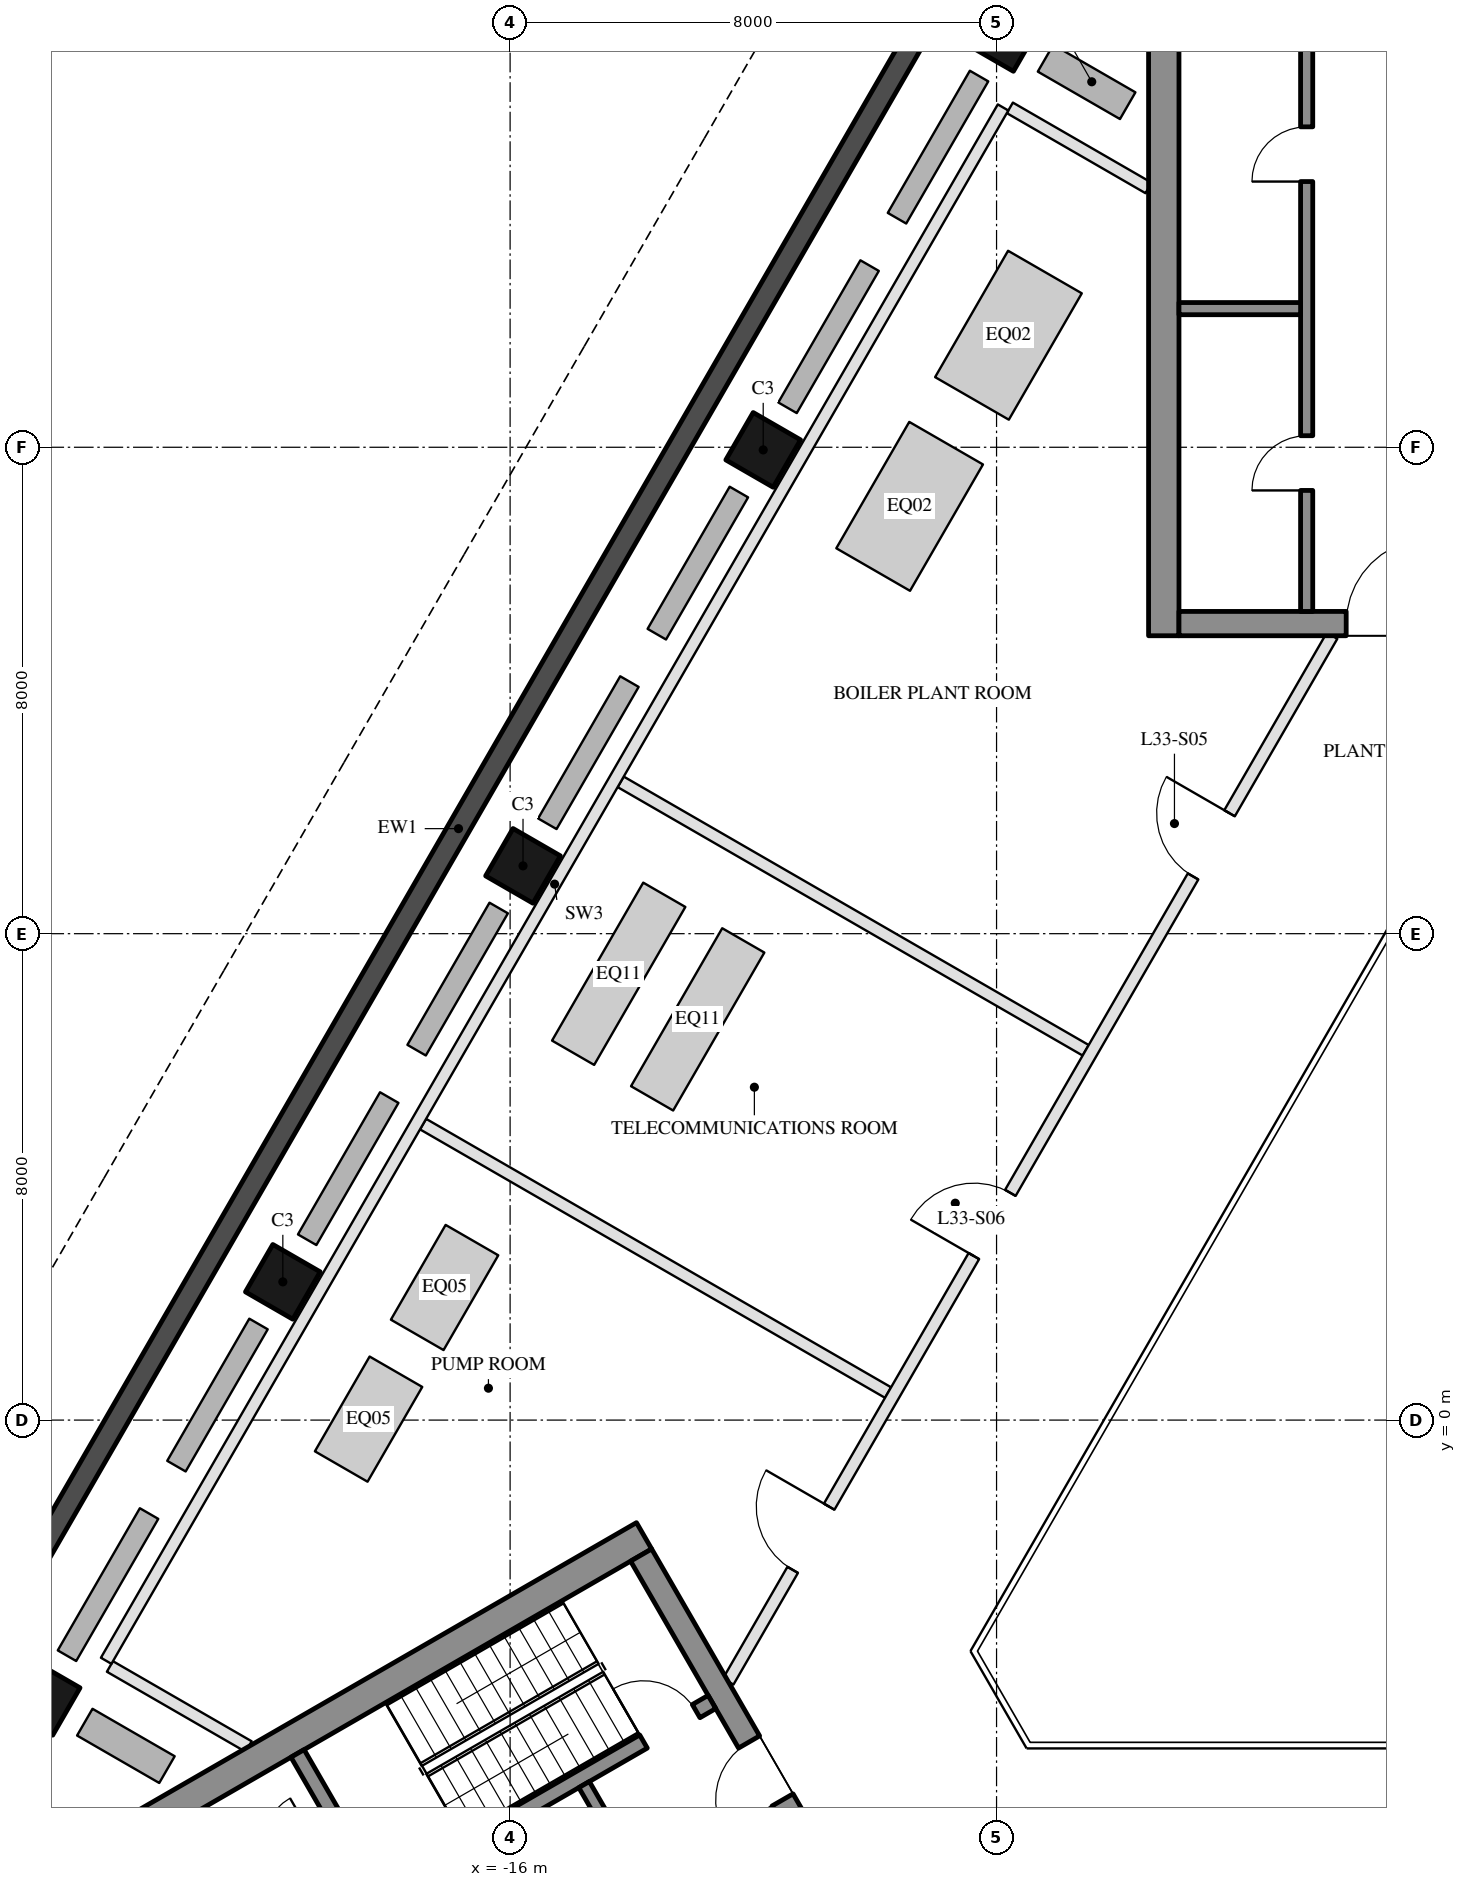
"""IFC4 building model, lengths in metres.
Left out: names, types, materials, properties, quantities, classifications, styles, units other than length and angle.
Written with IfcOpenShell. Run it as: python <this file> out.ifc"""

import sys

from ifc_helpers import new_model, si_unit, direction, frame, frame_2d, origin, origin_2d, place, context, subcontext, project, spatial, rectangle, hollow_rectangle, extrude, element, fill, save


model = new_model("IFC4")
c1 = context("Model", 3, precision=1e-05, world=origin(), true_north=direction((0.0, 1.0)))
c2 = subcontext(c1, "Body", "Model", "MODEL_VIEW")
j1 = project(units=[si_unit("LENGTHUNIT", "METRE"), si_unit("PLANEANGLEUNIT", "RADIAN")], contexts=[c1])
p1 = place(None, origin())
s1 = spatial("IfcSite", under=j1, at=p1, CompositionType="ELEMENT")
p2 = place(p1, origin())
s2 = spatial("IfcBuilding", under=s1, at=p2, CompositionType="ELEMENT")
p3 = place(p2, frame((0.0, 0.0, 142.1)))
s3 = spatial("IfcBuildingStorey", under=s2, at=p3, CompositionType="ELEMENT", Elevation=142.1)
for number, where, z_axis, x_axis in (
    (1, (-7.888, 22.798, 0.0), (0.0, 0.0, 1.0), (0.5, 0.866, 0.0)),
    (2, (-11.838, 15.957, 0.0), (0.0, 0.0, 1.0), (0.5, 0.866, 0.0)),
    (3, (-15.788, 9.115, 0.0), (0.0, 0.0, 1.0), (0.5, 0.866, 0.0)),
    (4, (-19.738, 2.273, 0.0), (0.0, 0.0, 1.0), (0.5, 0.866, 0.0)),
    (5, (-23.688, -4.568, 0.0), (0.0, 0.0, 1.0), (0.5, 0.866, 0.0)),
):
    element("IfcColumn", number, at=place(p3, frame(where, z_axis=z_axis, x_axis=x_axis)), inside=s3, PredefinedType="COLUMN", context=c2, shape_type="SweptSolid", body=[
        extrude(hollow_rectangle(XDim=0.9, YDim=0.9, WallThickness=0.04, at=origin_2d()), origin(), (0.0, 0.0, 1.0), 4.5),
    ])
p4 = place(p3, frame((-7.441, 26.022, 0.0), z_axis=(0.0, 0.0, 1.0), x_axis=(-0.499998380999, -0.866026338513, 0.0)))
e6 = element("IfcWall", 6, at=p4, inside=s3, PredefinedType="SOLIDWALL", context=c2, shape_type="SweptSolid", body=[
    extrude(rectangle(XDim=37.631, YDim=0.35, at=frame_2d((18.816, 0.0))), origin(), (0.0, 0.0, 1.0), 4.35),
])
p5 = place(p3, frame((-5.25, 12.9, 0.0), z_axis=(0.0, 0.0, 1.0), x_axis=(0.0, 1.0, 0.0)))
e7 = element("IfcWall", 7, at=p5, inside=s3, PredefinedType="SHEAR", context=c2, shape_type="SweptSolid", body=[
    extrude(rectangle(XDim=14.837, YDim=0.5, at=frame_2d((7.418, 0.0))), origin(), (0.0, 0.0, 1.0), 4.3),
])
p6 = place(p3, frame((5.0, 13.1, 0.0), z_axis=(0.0, 0.0, 1.0), x_axis=(-1.0, 0.0, 0.0)))
e8 = element("IfcWall", 8, at=p6, inside=s3, PredefinedType="SHEAR", context=c2, shape_type="SweptSolid", body=[
    extrude(rectangle(XDim=10.0, YDim=0.4, at=frame_2d((5.0, 0.0))), origin(), (0.0, 0.0, 1.0), 4.3),
])
p7 = place(p6, frame((3.55, 0.0, 0.0)))
e9 = element("IfcOpeningElement", 9, at=p7, cuts=e8, PredefinedType="OPENING", context=c2, shape_type="SweptSolid", body=[
    extrude(rectangle(XDim=1.1, YDim=2.1, at=frame_2d((0.55, 1.05))), frame((0.0, 0.21, 0.0), z_axis=(0.0, -1.0, 0.0), x_axis=(1.0, 0.0, 0.0)), (0.0, 0.0, 1.0), 0.42),
])
p8 = place(p6, frame((5.85, 0.0, 0.0)))
e10 = element("IfcOpeningElement", 10, at=p8, cuts=e8, PredefinedType="OPENING", context=c2, shape_type="SweptSolid", body=[
    extrude(rectangle(XDim=1.4, YDim=2.1, at=frame_2d((0.7, 1.05))), frame((0.0, 0.21, 0.0), z_axis=(0.0, -1.0, 0.0), x_axis=(1.0, 0.0, 0.0)), (0.0, 0.0, 1.0), 0.42),
])
p9 = place(p3, frame((-2.9, 13.3, 0.0), z_axis=(0.0, 0.0, 1.0), x_axis=(0.0, 1.0, 0.0)))
e11 = element("IfcWall", 11, at=p9, inside=s3, PredefinedType="SHEAR", context=c2, shape_type="SweptSolid", body=[
    extrude(rectangle(XDim=12.6, YDim=0.2, at=frame_2d((6.3, 0.0))), origin(), (0.0, 0.0, 1.0), 4.3),
])
p10 = place(p9, frame((1.99, 0.0, 0.0)))
e12 = element("IfcOpeningElement", 12, at=p10, cuts=e11, PredefinedType="OPENING", context=c2, shape_type="SweptSolid", body=[
    extrude(rectangle(XDim=0.9, YDim=2.1, at=frame_2d((0.45, 1.05))), frame((0.0, 0.11, 0.0), z_axis=(0.0, -1.0, 0.0), x_axis=(1.0, 0.0, 0.0)), (0.0, 0.0, 1.0), 0.22),
])
p11 = place(p9, frame((7.07, 0.0, 0.0)))
e13 = element("IfcOpeningElement", 13, at=p11, cuts=e11, PredefinedType="OPENING", context=c2, shape_type="SweptSolid", body=[
    extrude(rectangle(XDim=0.9, YDim=2.1, at=frame_2d((0.45, 1.05))), frame((0.0, 0.11, 0.0), z_axis=(0.0, -1.0, 0.0), x_axis=(1.0, 0.0, 0.0)), (0.0, 0.0, 1.0), 0.22),
])
p12 = place(p9, frame((10.51, 0.0, 0.0)))
e14 = element("IfcOpeningElement", 14, at=p12, cuts=e11, PredefinedType="OPENING", context=c2, shape_type="SweptSolid", body=[
    extrude(rectangle(XDim=0.9, YDim=2.1, at=frame_2d((0.45, 1.05))), frame((0.0, 0.11, 0.0), z_axis=(0.0, -1.0, 0.0), x_axis=(1.0, 0.0, 0.0)), (0.0, 0.0, 1.0), 0.22),
])
p13 = place(p3, frame((-3.0, 18.28, 0.0), z_axis=(0.0, 0.0, 1.0), x_axis=(-1.0, 0.0, 0.0)))
e15 = element("IfcWall", 15, at=p13, inside=s3, PredefinedType="SHEAR", context=c2, shape_type="SweptSolid", body=[
    extrude(rectangle(XDim=2.0, YDim=0.2, at=frame_2d((1.0, 0.0))), origin(), (0.0, 0.0, 1.0), 4.3),
])
p14 = place(p3, frame((-13.797, -1.903, 0.0), z_axis=(0.0, 0.0, 1.0), x_axis=(-0.866025009528, -0.500000682871, 0.0)))
e16 = element("IfcWall", 16, at=p14, inside=s3, PredefinedType="SHEAR", context=c2, shape_type="SweptSolid", body=[
    extrude(rectangle(XDim=14.837, YDim=0.5, at=frame_2d((7.418, 0.0))), origin(), (0.0, 0.0, 1.0), 4.3),
])
p15 = place(p3, frame((-13.845, -2.22, 0.0), z_axis=(0.0, 0.0, 1.0), x_axis=(0.500004234368, -0.866022959057, 0.0)))
e17 = element("IfcWall", 17, at=p15, inside=s3, PredefinedType="SHEAR", context=c2, shape_type="SweptSolid", body=[
    extrude(rectangle(XDim=10.0, YDim=0.4, at=frame_2d((5.0, 0.0))), origin(), (0.0, 0.0, 1.0), 4.3),
])
p16 = place(p15, frame((3.55, 0.0, 0.0)))
e18 = element("IfcOpeningElement", 18, at=p16, cuts=e17, PredefinedType="OPENING", context=c2, shape_type="SweptSolid", body=[
    extrude(rectangle(XDim=1.1, YDim=2.1, at=frame_2d((0.55, 1.05))), frame((0.0, 0.21, 0.0), z_axis=(0.0, -1.0, 0.0), x_axis=(1.0, 0.0, 0.0)), (0.0, 0.0, 1.0), 0.42),
])
p17 = place(p15, frame((5.85, 0.0, 0.0)))
e19 = element("IfcOpeningElement", 19, at=p17, cuts=e17, PredefinedType="OPENING", context=c2, shape_type="SweptSolid", body=[
    extrude(rectangle(XDim=1.4, YDim=2.1, at=frame_2d((0.7, 1.05))), frame((0.0, 0.21, 0.0), z_axis=(0.0, -1.0, 0.0), x_axis=(1.0, 0.0, 0.0)), (0.0, 0.0, 1.0), 0.42),
])
p18 = place(p3, frame((-12.681, -4.636, 0.0), z_axis=(0.0, 0.0, 1.0), x_axis=(-0.866021702275, -0.500006411147, 0.0)))
e20 = element("IfcWall", 20, at=p18, inside=s3, PredefinedType="SHEAR", context=c2, shape_type="SweptSolid", body=[
    extrude(rectangle(XDim=6.45, YDim=0.25, at=frame_2d((3.225, 0.0))), origin(), (0.0, 0.0, 1.0), 4.3),
])
p19 = place(p18, frame((0.3, 0.0, 0.0)))
e21 = element("IfcOpeningElement", 21, at=p19, cuts=e20, PredefinedType="OPENING", context=c2, shape_type="SweptSolid", body=[
    extrude(rectangle(XDim=1.0, YDim=2.1, at=frame_2d((0.5, 1.05))), frame((0.0, 0.135, 0.0), z_axis=(0.0, -1.0, 0.0), x_axis=(1.0, 0.0, 0.0)), (0.0, 0.0, 1.0), 0.27),
])
p20 = place(p3, frame((-19.496, -5.482, 0.0), z_axis=(0.0, 0.0, 1.0), x_axis=(0.499990435942, -0.866030925526, 0.0)))
e22 = element("IfcWall", 22, at=p20, inside=s3, PredefinedType="SHEAR", context=c2, shape_type="SweptSolid", body=[
    extrude(rectangle(XDim=2.55, YDim=0.25, at=frame_2d((1.275, 0.0))), origin(), (0.0, 0.0, 1.0), 4.3),
])
p21 = place(p3, frame((-14.783, -5.995, 0.0), z_axis=(0.0, 0.0, 1.0), x_axis=(0.49994636267, -0.866056369097, 0.0)))
e23 = element("IfcWall", 23, at=p21, inside=s3, PredefinedType="SHEAR", context=c2, shape_type="SweptSolid", body=[
    extrude(rectangle(XDim=2.8, YDim=0.2, at=frame_2d((1.4, 0.0))), origin(), (0.0, 0.0, 1.0), 4.3),
])
p22 = place(p21, frame((0.7, 0.0, 0.0)))
e24 = element("IfcOpeningElement", 24, at=p22, cuts=e23, PredefinedType="OPENING", context=c2, shape_type="SweptSolid", body=[
    extrude(rectangle(XDim=1.2, YDim=2.1, at=frame_2d((0.6, 1.05))), frame((0.0, 0.11, 0.0), z_axis=(0.0, -1.0, 0.0), x_axis=(1.0, 0.0, 0.0)), (0.0, 0.0, 1.0), 0.22),
])
p23 = place(p3, frame((-21.076, -6.395, 0.0), z_axis=(0.0, 0.0, 1.0), x_axis=(0.50001468107, -0.866016927499, 0.0)))
e25 = element("IfcWall", 25, at=p23, inside=s3, PredefinedType="PARTITIONING", context=c2, shape_type="SweptSolid", body=[
    extrude(rectangle(XDim=5.4, YDim=0.2, at=frame_2d((2.7, 0.0))), origin(), (0.0, 0.0, 1.0), 4.3),
])
p24 = place(p23, frame((1.913, 0.0, 0.0)))
e26 = element("IfcOpeningElement", 26, at=p24, cuts=e25, PredefinedType="OPENING", context=c2, shape_type="SweptSolid", body=[
    extrude(rectangle(XDim=0.9, YDim=2.1, at=frame_2d((0.45, 1.05))), frame((0.0, 0.11, 0.0), z_axis=(0.0, -1.0, 0.0), x_axis=(1.0, 0.0, 0.0)), (0.0, 0.0, 1.0), 0.22),
])
p25 = place(p23, frame((3.788, 0.0, 0.0)))
e27 = element("IfcOpeningElement", 27, at=p25, cuts=e25, PredefinedType="OPENING", context=c2, shape_type="SweptSolid", body=[
    extrude(rectangle(XDim=0.9, YDim=2.1, at=frame_2d((0.45, 1.05))), frame((0.0, 0.11, 0.0), z_axis=(0.0, -1.0, 0.0), x_axis=(1.0, 0.0, 0.0)), (0.0, 0.0, 1.0), 0.22),
])
p26 = place(p3, frame((-7.781, 21.582, 0.0), z_axis=(0.0, 0.0, 1.0), x_axis=(0.865998849027, -0.500045991369, 0.0)))
e28 = element("IfcWall", 28, at=p26, inside=s3, PredefinedType="PARTITIONING", context=c2, shape_type="SweptSolid", body=[
    extrude(rectangle(XDim=2.635, YDim=0.2, at=frame_2d((1.317, 0.0))), origin(), (0.0, 0.0, 1.0), 4.35),
])
for number, where, z_axis, x_axis in (
    (29, (-14.181, 10.497, 0.0), (0.0, 0.0, 1.0), (0.866, -0.5, 0.0)),
    (30, (-17.431, 4.868, 0.0), (0.0, 0.0, 1.0), (0.866, -0.5, 0.0)),
):
    element("IfcWall", number, at=place(p3, frame(where, z_axis=z_axis, x_axis=x_axis)), inside=s3, PredefinedType="PARTITIONING", context=c2, shape_type="SweptSolid", body=[
        extrude(rectangle(XDim=8.83, YDim=0.2, at=frame_2d((4.415, 0.0))), origin(), (0.0, 0.0, 1.0), 4.35),
    ])
p27 = place(p3, frame((-22.581, -4.052, 0.0), z_axis=(0.0, 0.0, 1.0), x_axis=(0.866038977738, -0.499976488486, 0.0)))
e31 = element("IfcWall", 31, at=p27, inside=s3, PredefinedType="PARTITIONING", context=c2, shape_type="SweptSolid", body=[
    extrude(rectangle(XDim=2.635, YDim=0.2, at=frame_2d((1.317, 0.0))), origin(), (0.0, 0.0, 1.0), 4.35),
])
p28 = place(p3, frame((-7.893, 21.589, 0.0), z_axis=(0.0, 0.0, 1.0), x_axis=(-0.499998500593, -0.866026269466, 0.0)))
e32 = element("IfcWall", 32, at=p28, inside=s3, PredefinedType="PARTITIONING", context=c2, shape_type="SweptSolid", body=[
    extrude(rectangle(XDim=29.5, YDim=0.2, at=frame_2d((14.75, 0.0))), origin(), (0.0, 0.0, 1.0), 3.75),
])
p29 = place(p3, frame((-2.482, 12.9, 0.0), z_axis=(0.0, 0.0, 1.0), x_axis=(-0.50000478328, -0.866022642139, 0.0)))
e33 = element("IfcWall", 33, at=p29, inside=s3, PredefinedType="PARTITIONING", context=c2, shape_type="SweptSolid", body=[
    extrude(rectangle(XDim=19.861, YDim=0.2, at=frame_2d((9.931, 0.0))), origin(), (0.0, 0.0, 1.0), 3.75),
])
p30 = place(p29, frame((3.371, 0.0, 0.0)))
e34 = element("IfcOpeningElement", 34, at=p30, cuts=e33, PredefinedType="OPENING", context=c2, shape_type="SweptSolid", body=[
    extrude(rectangle(XDim=1.2, YDim=2.1, at=frame_2d((0.6, 1.05))), frame((0.0, 0.11, 0.0), z_axis=(0.0, -1.0, 0.0), x_axis=(1.0, 0.0, 0.0)), (0.0, 0.0, 1.0), 0.22),
])
p31 = place(p29, frame((10.581, 0.0, 0.0)))
e35 = element("IfcOpeningElement", 35, at=p31, cuts=e33, PredefinedType="OPENING", context=c2, shape_type="SweptSolid", body=[
    extrude(rectangle(XDim=1.2, YDim=2.1, at=frame_2d((0.6, 1.05))), frame((0.0, 0.11, 0.0), z_axis=(0.0, -1.0, 0.0), x_axis=(1.0, 0.0, 0.0)), (0.0, 0.0, 1.0), 0.22),
])
p32 = place(p29, frame((16.54, 0.0, 0.0)))
e36 = element("IfcOpeningElement", 36, at=p32, cuts=e33, PredefinedType="OPENING", context=c2, shape_type="SweptSolid", body=[
    extrude(rectangle(XDim=1.2, YDim=2.1, at=frame_2d((0.6, 1.05))), frame((0.0, 0.11, 0.0), z_axis=(0.0, -1.0, 0.0), x_axis=(1.0, 0.0, 0.0)), (0.0, 0.0, 1.0), 0.22),
])
p33 = place(p10, origin())
e37 = element("IfcDoor", 37, at=p33, inside=s3, OperationType="SINGLE_SWING_LEFT", PredefinedType="DOOR", context=c2, shape_type="SweptSolid", body=[
    extrude(rectangle(XDim=0.9, YDim=2.1, at=frame_2d((0.45, 1.05))), frame((0.0, 0.025, 0.0), z_axis=(0.0, -1.0, 0.0), x_axis=(1.0, 0.0, 0.0)), (0.0, 0.0, 1.0), 0.05),
])
fill(e12, e37)
p34 = place(p11, origin())
e38 = element("IfcDoor", 38, at=p34, inside=s3, OperationType="SINGLE_SWING_LEFT", PredefinedType="DOOR", context=c2, shape_type="SweptSolid", body=[
    extrude(rectangle(XDim=0.9, YDim=2.1, at=frame_2d((0.45, 1.05))), frame((0.0, 0.025, 0.0), z_axis=(0.0, -1.0, 0.0), x_axis=(1.0, 0.0, 0.0)), (0.0, 0.0, 1.0), 0.05),
])
fill(e13, e38)
p35 = place(p8, frame((1.4, 0.0, 0.0), z_axis=(0.0, 0.0, 1.0), x_axis=(-1.0, 0.0, 0.0)))
e39 = element("IfcDoor", 39, at=p35, inside=s3, OperationType="DOUBLE_DOOR_SINGLE_SWING", PredefinedType="DOOR", context=c2, shape_type="SweptSolid", body=[
    extrude(rectangle(XDim=1.4, YDim=2.1, at=frame_2d((0.7, 1.05))), frame((0.0, 0.025, 0.0), z_axis=(0.0, -1.0, 0.0), x_axis=(1.0, 0.0, 0.0)), (0.0, 0.0, 1.0), 0.05),
])
fill(e10, e39)
p36 = place(p16, frame((1.1, 0.0, 0.0), z_axis=(0.0, 0.0, 1.0), x_axis=(-1.0, 0.0, 0.0)))
e40 = element("IfcDoor", 40, at=p36, inside=s3, OperationType="SINGLE_SWING_LEFT", PredefinedType="DOOR", context=c2, shape_type="SweptSolid", body=[
    extrude(rectangle(XDim=1.1, YDim=2.1, at=frame_2d((0.55, 1.05))), frame((0.0, 0.025, 0.0), z_axis=(0.0, -1.0, 0.0), x_axis=(1.0, 0.0, 0.0)), (0.0, 0.0, 1.0), 0.05),
])
fill(e18, e40)
p37 = place(p19, frame((1.0, 0.0, 0.0), z_axis=(0.0, 0.0, 1.0), x_axis=(-1.0, 0.0, 0.0)))
e41 = element("IfcDoor", 41, at=p37, inside=s3, OperationType="SINGLE_SWING_LEFT", PredefinedType="DOOR", context=c2, shape_type="SweptSolid", body=[
    extrude(rectangle(XDim=1.0, YDim=2.1, at=frame_2d((0.5, 1.05))), frame((0.0, 0.025, 0.0), z_axis=(0.0, -1.0, 0.0), x_axis=(1.0, 0.0, 0.0)), (0.0, 0.0, 1.0), 0.05),
])
fill(e21, e41)
p38 = place(p30, frame((1.2, 0.0, 0.0), z_axis=(0.0, 0.0, 1.0), x_axis=(-1.0, 0.0, 0.0)))
e42 = element("IfcDoor", 42, at=p38, inside=s3, OperationType="SINGLE_SWING_RIGHT", PredefinedType="DOOR", context=c2, shape_type="SweptSolid", body=[
    extrude(rectangle(XDim=1.2, YDim=2.1, at=frame_2d((0.6, 1.05))), frame((0.0, 0.025, 0.0), z_axis=(0.0, -1.0, 0.0), x_axis=(1.0, 0.0, 0.0)), (0.0, 0.0, 1.0), 0.05),
])
fill(e34, e42)
p39 = place(p31, frame((1.2, 0.0, 0.0), z_axis=(0.0, 0.0, 1.0), x_axis=(-1.0, 0.0, 0.0)))
e43 = element("IfcDoor", 43, at=p39, inside=s3, OperationType="SINGLE_SWING_LEFT", PredefinedType="DOOR", context=c2, shape_type="SweptSolid", body=[
    extrude(rectangle(XDim=1.2, YDim=2.1, at=frame_2d((0.6, 1.05))), frame((0.0, 0.025, 0.0), z_axis=(0.0, -1.0, 0.0), x_axis=(1.0, 0.0, 0.0)), (0.0, 0.0, 1.0), 0.05),
])
fill(e35, e43)
p40 = place(p32, frame((1.2, 0.0, 0.0), z_axis=(0.0, 0.0, 1.0), x_axis=(-1.0, 0.0, 0.0)))
e44 = element("IfcDoor", 44, at=p40, inside=s3, OperationType="SINGLE_SWING_RIGHT", PredefinedType="DOOR", context=c2, shape_type="SweptSolid", body=[
    extrude(rectangle(XDim=1.2, YDim=2.1, at=frame_2d((0.6, 1.05))), frame((0.0, 0.025, 0.0), z_axis=(0.0, -1.0, 0.0), x_axis=(1.0, 0.0, 0.0)), (0.0, 0.0, 1.0), 0.05),
])
fill(e36, e44)
save(model, sys.argv[1])
